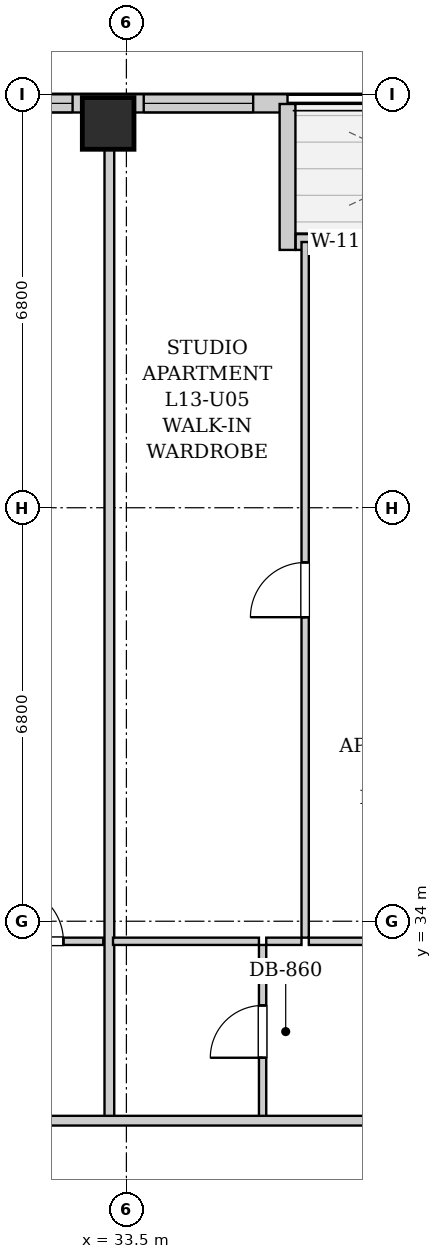
"""IFC4 building model, lengths in metres.
Left out: names, types, materials, properties, quantities, classifications, styles, units other than length and angle.
Written with IfcOpenShell. Run it as: python <this file> out.ifc"""

import sys

from ifc_helpers import new_model, si_unit, direction, frame, frame_2d, origin, origin_2d, place, context, subcontext, project, spatial, rectangle, extrude, element, fill, save


model = new_model("IFC4")
c1 = context("Model", 3, precision=1e-05, world=origin(), true_north=direction((0.0, 1.0)))
c2 = subcontext(c1, "Body", "Model", "MODEL_VIEW")
j1 = project(units=[si_unit("LENGTHUNIT", "METRE"), si_unit("PLANEANGLEUNIT", "RADIAN")], contexts=[c1])
p1 = place(None, origin())
s1 = spatial("IfcSite", under=j1, at=p1, CompositionType="ELEMENT")
p2 = place(p1, origin())
s2 = spatial("IfcBuilding", under=s1, at=p2, CompositionType="ELEMENT")
p3 = place(p2, frame((0.0, 0.0, 51.4)))
s3 = spatial("IfcBuildingStorey", under=s2, at=p3, CompositionType="ELEMENT", Elevation=51.4)
p4 = place(p3, frame((33.2, 47.12, 0.0), z_axis=(0.0, 0.0, 1.0), x_axis=(1.0, 0.0, 0.0)))
e1 = element("IfcColumn", 1, at=p4, inside=s3, PredefinedType="COLUMN", context=c2, shape_type="SweptSolid", body=[
    extrude(rectangle(XDim=0.85, YDim=0.85, at=origin_2d()), origin(), (0.0, 0.0, 1.0), 3.2),
])
p5 = place(p3, frame((10.0, 47.45, 0.0), z_axis=(0.0, 0.0, 1.0), x_axis=(1.0, 0.0, 0.0)))
e2 = element("IfcWall", 2, at=p5, inside=s3, PredefinedType="SOLIDWALL", context=c2, shape_type="SweptSolid", body=[
    extrude(rectangle(XDim=26.15, YDim=0.3, at=frame_2d((13.075, 0.0))), origin(), (0.0, 0.0, 1.0), 1.975),
])
p6 = place(p5, frame((5.862, 0.0, 0.55)))
e3 = element("IfcOpeningElement", 3, at=p6, cuts=e2, PredefinedType="OPENING", context=c2, shape_type="SweptSolid", body=[
    extrude(rectangle(XDim=1.35, YDim=1.2, at=frame_2d((0.675, 0.6))), frame((0.0, 0.16, 0.0), z_axis=(0.0, -1.0, 0.0), x_axis=(1.0, 0.0, 0.0)), (0.0, 0.0, 1.0), 0.32),
])
p7 = place(p5, frame((8.944, 0.0, 0.55)))
e4 = element("IfcOpeningElement", 4, at=p7, cuts=e2, PredefinedType="OPENING", context=c2, shape_type="SweptSolid", body=[
    extrude(rectangle(XDim=1.8, YDim=1.2, at=frame_2d((0.9, 0.6))), frame((0.0, 0.16, 0.0), z_axis=(0.0, -1.0, 0.0), x_axis=(1.0, 0.0, 0.0)), (0.0, 0.0, 1.0), 0.32),
])
p8 = place(p5, frame((18.788, 0.0, 0.55)))
e5 = element("IfcOpeningElement", 5, at=p8, cuts=e2, PredefinedType="OPENING", context=c2, shape_type="SweptSolid", body=[
    extrude(rectangle(XDim=1.8, YDim=1.2, at=frame_2d((0.9, 0.6))), frame((0.0, 0.16, 0.0), z_axis=(0.0, -1.0, 0.0), x_axis=(1.0, 0.0, 0.0)), (0.0, 0.0, 1.0), 0.32),
])
p9 = place(p5, frame((21.265, 0.0, 0.55)))
e6 = element("IfcOpeningElement", 6, at=p9, cuts=e2, PredefinedType="OPENING", context=c2, shape_type="SweptSolid", body=[
    extrude(rectangle(XDim=1.35, YDim=1.2, at=frame_2d((0.675, 0.6))), frame((0.0, 0.16, 0.0), z_axis=(0.0, -1.0, 0.0), x_axis=(1.0, 0.0, 0.0)), (0.0, 0.0, 1.0), 0.32),
])
p10 = place(p5, frame((23.785, 0.0, 0.55)))
e7 = element("IfcOpeningElement", 7, at=p10, cuts=e2, PredefinedType="OPENING", context=c2, shape_type="SweptSolid", body=[
    extrude(rectangle(XDim=1.8, YDim=1.2, at=frame_2d((0.9, 0.6))), frame((0.0, 0.16, 0.0), z_axis=(0.0, -1.0, 0.0), x_axis=(1.0, 0.0, 0.0)), (0.0, 0.0, 1.0), 0.32),
])
p11 = place(p3, frame((36.15, 47.44, 0.0), z_axis=(0.0, 0.0, 1.0), x_axis=(0.0, -1.0, 0.0)))
e8 = element("IfcWall", 8, at=p11, inside=s3, PredefinedType="SOLIDWALL", context=c2, shape_type="SweptSolid", body=[
    extrude(rectangle(XDim=2.4, YDim=0.26, at=frame_2d((1.2, 0.0))), origin(), (0.0, 0.0, 1.0), 2.94),
])
p12 = place(p3, frame((36.284, 45.17, 0.0), z_axis=(0.0, 0.0, 1.0), x_axis=(1.0, 0.0, 0.0)))
e9 = element("IfcWall", 9, at=p12, inside=s3, PredefinedType="SOLIDWALL", context=c2, shape_type="SweptSolid", body=[
    extrude(rectangle(XDim=4.332, YDim=0.26, at=frame_2d((2.166, 0.0))), origin(), (0.0, 0.0, 1.0), 2.94),
])
p13 = place(p12, frame((1.616, 0.0, 0.0)))
e10 = element("IfcOpeningElement", 10, at=p13, cuts=e9, PredefinedType="OPENING", context=c2, shape_type="SweptSolid", body=[
    extrude(rectangle(XDim=1.1, YDim=2.0, at=frame_2d((0.55, 1.0))), frame((0.0, 0.14, 0.0), z_axis=(0.0, -1.0, 0.0), x_axis=(1.0, 0.0, 0.0)), (0.0, 0.0, 1.0), 0.28),
])
p14 = place(p12, frame((0.606, 0.0, 0.55)))
e11 = element("IfcOpeningElement", 11, at=p14, cuts=e9, PredefinedType="OPENING", context=c2, shape_type="SweptSolid", body=[
    extrude(rectangle(XDim=0.85, YDim=1.2, at=frame_2d((0.425, 0.6))), frame((0.0, 0.14, 0.0), z_axis=(0.0, -1.0, 0.0), x_axis=(1.0, 0.0, 0.0)), (0.0, 0.0, 1.0), 0.28),
])
p15 = place(p3, frame((30.908, 33.67, 0.0), z_axis=(0.0, 0.0, 1.0), x_axis=(1.0, 0.0, 0.0)))
e12 = element("IfcWall", 12, at=p15, inside=s3, PredefinedType="PARTITIONING", context=c2, shape_type="SweptSolid", body=[
    extrude(rectangle(XDim=2.212, YDim=0.12, at=frame_2d((1.106, 0.0))), origin(), (0.0, 0.0, 1.0), 2.94),
])
p16 = place(p15, frame((0.656, 0.0, 0.0)))
e13 = element("IfcOpeningElement", 13, at=p16, cuts=e12, PredefinedType="OPENING", context=c2, shape_type="SweptSolid", body=[
    extrude(rectangle(XDim=0.9, YDim=2.05, at=frame_2d((0.45, 1.025))), frame((0.0, 0.07, 0.0), z_axis=(0.0, -1.0, 0.0), x_axis=(1.0, 0.0, 0.0)), (0.0, 0.0, 1.0), 0.14),
])
p17 = place(p3, frame((33.22, 30.76, 0.0), z_axis=(0.0, 0.0, 1.0), x_axis=(0.0, 1.0, 0.0)))
e14 = element("IfcWall", 14, at=p17, inside=s3, PredefinedType="PARTITIONING", context=c2, shape_type="SweptSolid", body=[
    extrude(rectangle(XDim=16.56, YDim=0.16, at=frame_2d((8.28, 0.0))), origin(), (0.0, 0.0, 1.0), 2.232),
])
p18 = place(p3, frame((35.74, 30.76, 0.0), z_axis=(0.0, 0.0, 1.0), x_axis=(0.0, 1.0, 0.0)))
e15 = element("IfcWall", 15, at=p18, inside=s3, PredefinedType="PARTITIONING", context=c2, shape_type="SweptSolid", body=[
    extrude(rectangle(XDim=2.85, YDim=0.12, at=frame_2d((1.425, 0.0))), origin(), (0.0, 0.0, 1.0), 2.94),
])
p19 = place(p18, frame((0.995, 0.0, 0.0)))
e16 = element("IfcOpeningElement", 16, at=p19, cuts=e15, PredefinedType="OPENING", context=c2, shape_type="SweptSolid", body=[
    extrude(rectangle(XDim=0.86, YDim=2.05, at=frame_2d((0.43, 1.025))), frame((0.0, 0.07, 0.0), z_axis=(0.0, -1.0, 0.0), x_axis=(1.0, 0.0, 0.0)), (0.0, 0.0, 1.0), 0.14),
])
p20 = place(p3, frame((33.28, 33.67, 0.0), z_axis=(0.0, 0.0, 1.0), x_axis=(1.0, 0.0, 0.0)))
e17 = element("IfcWall", 17, at=p20, inside=s3, PredefinedType="PARTITIONING", context=c2, shape_type="SweptSolid", body=[
    extrude(rectangle(XDim=2.4, YDim=0.12, at=frame_2d((1.2, 0.0))), origin(), (0.0, 0.0, 1.0), 2.94),
])
p21 = place(p3, frame((35.8, 33.67, 0.0), z_axis=(0.0, 0.0, 1.0), x_axis=(1.0, 0.0, 0.0)))
e18 = element("IfcWall", 18, at=p21, inside=s3, PredefinedType="PARTITIONING", context=c2, shape_type="SweptSolid", body=[
    extrude(rectangle(XDim=0.58, YDim=0.12, at=frame_2d((0.29, 0.0))), origin(), (0.0, 0.0, 1.0), 2.94),
])
p22 = place(p3, frame((36.5, 33.67, 0.0), z_axis=(0.0, 0.0, 1.0), x_axis=(1.0, 0.0, 0.0)))
e19 = element("IfcWall", 19, at=p22, inside=s3, PredefinedType="PARTITIONING", context=c2, shape_type="SweptSolid", body=[
    extrude(rectangle(XDim=3.1, YDim=0.12, at=frame_2d((1.55, 0.0))), origin(), (0.0, 0.0, 1.0), 2.94),
])
p23 = place(p22, frame((1.1, 0.0, 0.0)))
e20 = element("IfcOpeningElement", 20, at=p23, cuts=e19, PredefinedType="OPENING", context=c2, shape_type="SweptSolid", body=[
    extrude(rectangle(XDim=0.9, YDim=2.05, at=frame_2d((0.45, 1.025))), frame((0.0, 0.07, 0.0), z_axis=(0.0, -1.0, 0.0), x_axis=(1.0, 0.0, 0.0)), (0.0, 0.0, 1.0), 0.14),
])
p24 = place(p3, frame((36.44, 33.73, 0.0), z_axis=(0.0, 0.0, 1.0), x_axis=(0.0, 1.0, 0.0)))
e21 = element("IfcWall", 21, at=p24, inside=s3, PredefinedType="PARTITIONING", context=c2, shape_type="SweptSolid", body=[
    extrude(rectangle(XDim=11.44, YDim=0.12, at=frame_2d((5.72, 0.0))), origin(), (0.0, 0.0, 1.0), 2.94),
])
p25 = place(p24, frame((5.27, 0.0, 0.0)))
e22 = element("IfcOpeningElement", 22, at=p25, cuts=e21, PredefinedType="OPENING", context=c2, shape_type="SweptSolid", body=[
    extrude(rectangle(XDim=0.9, YDim=2.05, at=frame_2d((0.45, 1.025))), frame((0.0, 0.07, 0.0), z_axis=(0.0, -1.0, 0.0), x_axis=(1.0, 0.0, 0.0)), (0.0, 0.0, 1.0), 0.14),
])
p26 = place(p3, frame((10.05, 30.72, 0.0), z_axis=(0.0, 0.0, 1.0), x_axis=(1.0, 0.0, 0.0)))
e23 = element("IfcWall", 23, at=p26, inside=s3, PredefinedType="PARTITIONING", context=c2, shape_type="SweptSolid", body=[
    extrude(rectangle(XDim=33.9, YDim=0.16, at=frame_2d((16.95, 0.0))), origin(), (0.0, 0.0, 1.0), 2.94),
])
p27 = place(p26, frame((4.165, 0.0, 0.0)))
e24 = element("IfcOpeningElement", 24, at=p27, cuts=e23, PredefinedType="OPENING", context=c2, shape_type="SweptSolid", body=[
    extrude(rectangle(XDim=0.95, YDim=2.1, at=frame_2d((0.475, 1.05))), frame((0.0, 0.09, 0.0), z_axis=(0.0, -1.0, 0.0), x_axis=(1.0, 0.0, 0.0)), (0.0, 0.0, 1.0), 0.18),
])
p28 = place(p26, frame((27.495, 0.0, 0.0)))
e25 = element("IfcOpeningElement", 25, at=p28, cuts=e23, PredefinedType="OPENING", context=c2, shape_type="SweptSolid", body=[
    extrude(rectangle(XDim=0.95, YDim=2.1, at=frame_2d((0.475, 1.05))), frame((0.0, 0.09, 0.0), z_axis=(0.0, -1.0, 0.0), x_axis=(1.0, 0.0, 0.0)), (0.0, 0.0, 1.0), 0.18),
])
p29 = place(p16, origin())
e26 = element("IfcDoor", 26, at=p29, inside=s3, OperationType="SINGLE_SWING_LEFT", PredefinedType="DOOR", context=c2, shape_type="SweptSolid", body=[
    extrude(rectangle(XDim=0.9, YDim=2.05, at=frame_2d((0.45, 1.025))), frame((0.0, 0.025, 0.0), z_axis=(0.0, -1.0, 0.0), x_axis=(1.0, 0.0, 0.0)), (0.0, 0.0, 1.0), 0.05),
])
fill(e13, e26)
p30 = place(p19, origin())
e27 = element("IfcDoor", 27, at=p30, inside=s3, OperationType="SINGLE_SWING_LEFT", PredefinedType="DOOR", context=c2, shape_type="SweptSolid", body=[
    extrude(rectangle(XDim=0.86, YDim=2.05, at=frame_2d((0.43, 1.025))), frame((0.0, 0.025, 0.0), z_axis=(0.0, -1.0, 0.0), x_axis=(1.0, 0.0, 0.0)), (0.0, 0.0, 1.0), 0.05),
])
fill(e16, e27)
p31 = place(p25, origin())
e28 = element("IfcDoor", 28, at=p31, inside=s3, OperationType="SINGLE_SWING_LEFT", PredefinedType="DOOR", context=c2, shape_type="SweptSolid", body=[
    extrude(rectangle(XDim=0.9, YDim=2.05, at=frame_2d((0.45, 1.025))), frame((0.0, 0.025, 0.0), z_axis=(0.0, -1.0, 0.0), x_axis=(1.0, 0.0, 0.0)), (0.0, 0.0, 1.0), 0.05),
])
fill(e22, e28)
p32 = place(p9, origin())
e29 = element("IfcWindow", 29, at=p32, inside=s3, PartitioningType="SINGLE_PANEL", PredefinedType="WINDOW", context=c2, shape_type="SweptSolid", body=[
    extrude(rectangle(XDim=1.35, YDim=1.2, at=frame_2d((0.675, 0.6))), frame((0.0, 0.03, 0.0), z_axis=(0.0, -1.0, 0.0), x_axis=(1.0, 0.0, 0.0)), (0.0, 0.0, 1.0), 0.06),
])
fill(e6, e29)
p33 = place(p10, origin())
e30 = element("IfcWindow", 30, at=p33, inside=s3, PartitioningType="DOUBLE_PANEL_VERTICAL", PredefinedType="WINDOW", context=c2, shape_type="SweptSolid", body=[
    extrude(rectangle(XDim=1.8, YDim=1.2, at=frame_2d((0.9, 0.6))), frame((0.0, 0.03, 0.0), z_axis=(0.0, -1.0, 0.0), x_axis=(1.0, 0.0, 0.0)), (0.0, 0.0, 1.0), 0.06),
])
fill(e7, e30)
p34 = place(p14, origin())
e31 = element("IfcWindow", 31, at=p34, inside=s3, PartitioningType="SINGLE_PANEL", PredefinedType="WINDOW", context=c2, shape_type="SweptSolid", body=[
    extrude(rectangle(XDim=0.85, YDim=1.2, at=frame_2d((0.425, 0.6))), frame((0.0, 0.03, 0.0), z_axis=(0.0, -1.0, 0.0), x_axis=(1.0, 0.0, 0.0)), (0.0, 0.0, 1.0), 0.06),
])
fill(e11, e31)
save(model, sys.argv[1])
